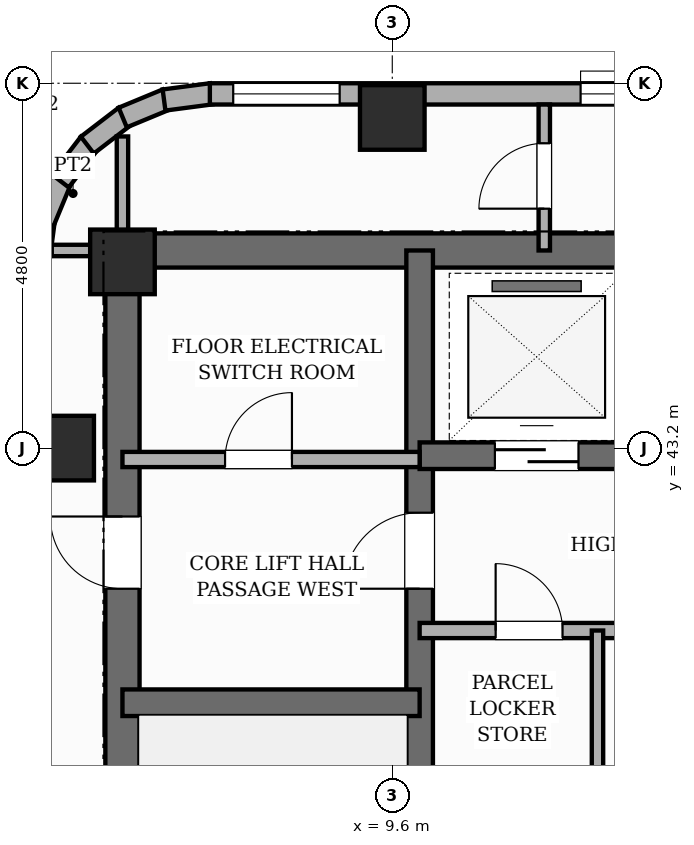
"""IFC4 building model, lengths in metres.
Left out: names, types, materials, properties, quantities, classifications, styles, units other than length and angle.
Written with IfcOpenShell. Run it as: python <this file> out.ifc"""

import sys

from ifc_helpers import new_model, si_unit, direction, frame, frame_2d, origin, origin_2d, place, context, subcontext, project, spatial, rectangle, extrude, element, fill, save


model = new_model("IFC4")
c1 = context("Model", 3, precision=1e-05, world=origin(), true_north=direction((0.0, 1.0)))
c2 = subcontext(c1, "Body", "Model", "MODEL_VIEW")
j1 = project(units=[si_unit("LENGTHUNIT", "METRE"), si_unit("PLANEANGLEUNIT", "RADIAN")], contexts=[c1])
p1 = place(None, origin())
s1 = spatial("IfcSite", under=j1, at=p1, CompositionType="ELEMENT")
p2 = place(p1, origin())
s2 = spatial("IfcBuilding", under=s1, at=p2, CompositionType="ELEMENT")
p3 = place(p2, frame((0.0, 0.0, 207.4)))
s3 = spatial("IfcBuildingStorey", under=s2, at=p3, CompositionType="ELEMENT", Elevation=207.4)
p4 = place(p3, frame((6.05, 30.675, 0.0), z_axis=(0.0, 0.0, 1.0), x_axis=(0.0, 1.0, 0.0)))
e1 = element("IfcWall", 1, at=p4, inside=s3, PredefinedType="SHEAR", context=c2, shape_type="SweptSolid", body=[
    extrude(rectangle(XDim=15.35, YDim=0.45, at=frame_2d((7.675, 0.0))), origin(), (0.0, 0.0, 1.0), 3.6),
])
p5 = place(p4, frame((10.675, 0.0, 0.0)))
e2 = element("IfcOpeningElement", 2, at=p5, cuts=e1, PredefinedType="OPENING", context=c2, shape_type="SweptSolid", body=[
    extrude(rectangle(XDim=0.95, YDim=2.15, at=frame_2d((0.475, 1.075))), frame((0.0, 0.235, 0.0), z_axis=(0.0, -1.0, 0.0), x_axis=(1.0, 0.0, 0.0)), (0.0, 0.0, 1.0), 0.47),
])
p6 = place(p3, frame((6.05, 45.8, 0.0), z_axis=(0.0, 0.0, 1.0), x_axis=(1.0, 0.0, 0.0)))
e3 = element("IfcWall", 3, at=p6, inside=s3, PredefinedType="SHEAR", context=c2, shape_type="SweptSolid", body=[
    extrude(rectangle(XDim=16.7, YDim=0.45, at=frame_2d((8.35, 0.0))), origin(), (0.0, 0.0, 1.0), 3.6),
])
p7 = place(p3, frame((9.96, 30.9, 0.0), z_axis=(0.0, 0.0, 1.0), x_axis=(0.0, 1.0, 0.0)))
e4 = element("IfcWall", 4, at=p7, inside=s3, PredefinedType="SHEAR", context=c2, shape_type="SweptSolid", body=[
    extrude(rectangle(XDim=14.9, YDim=0.35, at=frame_2d((7.45, 0.0))), origin(), (0.0, 0.0, 1.0), 3.6),
])
p8 = place(p7, frame((0.65, 0.0, 0.0)))
e5 = element("IfcOpeningElement", 5, at=p8, cuts=e4, PredefinedType="OPENING", context=c2, shape_type="SweptSolid", body=[
    extrude(rectangle(XDim=0.95, YDim=2.1, at=frame_2d((0.475, 1.05))), frame((0.0, 0.185, 0.0), z_axis=(0.0, -1.0, 0.0), x_axis=(1.0, 0.0, 0.0)), (0.0, 0.0, 1.0), 0.37),
])
p9 = place(p7, frame((10.45, 0.0, 0.0)))
e6 = element("IfcOpeningElement", 6, at=p9, cuts=e4, PredefinedType="OPENING", context=c2, shape_type="SweptSolid", body=[
    extrude(rectangle(XDim=1.0, YDim=2.15, at=frame_2d((0.5, 1.075))), frame((0.0, 0.185, 0.0), z_axis=(0.0, -1.0, 0.0), x_axis=(1.0, 0.0, 0.0)), (0.0, 0.0, 1.0), 0.37),
])
p10 = place(p3, frame((6.05, 39.85, 0.0), z_axis=(0.0, 0.0, 1.0), x_axis=(1.0, 0.0, 0.0)))
e7 = element("IfcWall", 7, at=p10, inside=s3, PredefinedType="SHEAR", context=c2, shape_type="SweptSolid", body=[
    extrude(rectangle(XDim=3.91, YDim=0.35, at=frame_2d((1.955, 0.0))), origin(), (0.0, 0.0, 1.0), 3.6),
])
p11 = place(p3, frame((9.96, 43.1, 0.0), z_axis=(0.0, 0.0, 1.0), x_axis=(1.0, 0.0, 0.0)))
e8 = element("IfcWall", 8, at=p11, inside=s3, PredefinedType="SHEAR", context=c2, shape_type="SweptSolid", body=[
    extrude(rectangle(XDim=8.88, YDim=0.35, at=frame_2d((4.44, 0.0))), origin(), (0.0, 0.0, 1.0), 3.6),
])
p12 = place(p11, frame((0.99, 0.0, 0.0)))
e9 = element("IfcOpeningElement", 9, at=p12, cuts=e8, PredefinedType="OPENING", context=c2, shape_type="SweptSolid", body=[
    extrude(rectangle(XDim=1.1, YDim=2.15, at=frame_2d((0.55, 1.075))), frame((0.0, 0.185, 0.0), z_axis=(0.0, -1.0, 0.0), x_axis=(1.0, 0.0, 0.0)), (0.0, 0.0, 1.0), 0.37),
])
p13 = place(p11, frame((3.89, 0.0, 0.0)))
e10 = element("IfcOpeningElement", 10, at=p13, cuts=e8, PredefinedType="OPENING", context=c2, shape_type="SweptSolid", body=[
    extrude(rectangle(XDim=1.1, YDim=2.15, at=frame_2d((0.55, 1.075))), frame((0.0, 0.185, 0.0), z_axis=(0.0, -1.0, 0.0), x_axis=(1.0, 0.0, 0.0)), (0.0, 0.0, 1.0), 0.37),
])
p14 = place(p11, frame((6.79, 0.0, 0.0)))
e11 = element("IfcOpeningElement", 11, at=p14, cuts=e8, PredefinedType="OPENING", context=c2, shape_type="SweptSolid", body=[
    extrude(rectangle(XDim=1.1, YDim=2.15, at=frame_2d((0.55, 1.075))), frame((0.0, 0.185, 0.0), z_axis=(0.0, -1.0, 0.0), x_axis=(1.0, 0.0, 0.0)), (0.0, 0.0, 1.0), 0.37),
])
for number, where, z_axis, x_axis in (
    (12, (5.25, 43.2, 0.0), (0.0, 0.0, 1.0), (1.0, 0.0, 0.0)),
    (13, (6.05, 45.65, 0.0), (0.0, 0.0, 1.0), (1.0, 0.0, 0.0)),
    (14, (9.6, 47.55, 0.0), (0.0, 0.0, 1.0), (1.0, 0.0, 0.0)),
):
    element("IfcColumn", number, at=place(p3, frame(where, z_axis=z_axis, x_axis=x_axis)), inside=s3, PredefinedType="COLUMN", context=c2, shape_type="SweptSolid", body=[
        extrude(rectangle(XDim=0.85, YDim=0.85, at=origin_2d()), origin(), (0.0, 0.0, 1.0), 3.6),
    ])
for number, where, z_axis, x_axis in (
    (15, (4.939, 45.582, 0.0), (0.0, 0.0, 1.0), (0.131, 0.991, 0.0)),
    (16, (5.011, 46.167, 0.0), (0.0, 0.0, 1.0), (0.383, 0.924, 0.0)),
    (17, (5.233, 46.715, 0.0), (0.0, 0.0, 1.0), (0.609, 0.793, 0.0)),
    (18, (5.588, 47.186, 0.0), (0.0, 0.0, 1.0), (0.793, 0.609, 0.0)),
):
    element("IfcWall", number, at=place(p3, frame(where, z_axis=z_axis, x_axis=x_axis)), inside=s3, PredefinedType="STANDARD", context=c2, shape_type="SweptSolid", body=[
        extrude(rectangle(XDim=0.626, YDim=0.28, at=frame_2d((0.313, 0.0))), origin(), (0.0, 0.0, 1.0), 3.38),
    ])
p15 = place(p3, frame((6.054, 47.549, 0.0), z_axis=(0.0, 0.0, 1.0), x_axis=(0.923974080304, 0.382455093999, 0.0)))
e19 = element("IfcWall", 19, at=p15, inside=s3, PredefinedType="STANDARD", context=c2, shape_type="SweptSolid", body=[
    extrude(rectangle(XDim=0.626, YDim=0.28, at=frame_2d((0.313, 0.0))), origin(), (0.0, 0.0, 1.0), 3.38),
])
p16 = place(p3, frame((6.597, 47.779, 0.0), z_axis=(0.0, 0.0, 1.0), x_axis=(0.9914410257, 0.130555323746, 0.0)))
e20 = element("IfcWall", 20, at=p16, inside=s3, PredefinedType="STANDARD", context=c2, shape_type="SweptSolid", body=[
    extrude(rectangle(XDim=0.626, YDim=0.28, at=frame_2d((0.313, 0.0))), origin(), (0.0, 0.0, 1.0), 3.38),
])
p17 = place(p3, frame((7.2, 47.86, 0.0), z_axis=(0.0, 0.0, 1.0), x_axis=(1.0, 0.0, 0.0)))
e21 = element("IfcWall", 21, at=p17, inside=s3, PredefinedType="STANDARD", context=c2, shape_type="SweptSolid", body=[
    extrude(rectangle(XDim=43.2, YDim=0.28, at=frame_2d((21.6, 0.0))), origin(), (0.0, 0.0, 1.0), 2.66),
])
p18 = place(p17, frame((19.028, 0.0, 0.65)))
e22 = element("IfcOpeningElement", 22, at=p18, cuts=e21, PredefinedType="OPENING", context=c2, shape_type="SweptSolid", body=[
    extrude(rectangle(XDim=1.4, YDim=1.1, at=frame_2d((0.7, 0.55))), frame((0.0, 0.15, 0.0), z_axis=(0.0, -1.0, 0.0), x_axis=(1.0, 0.0, 0.0)), (0.0, 0.0, 1.0), 0.3),
])
p19 = place(p17, frame((0.308, 0.0, 0.65)))
e23 = element("IfcOpeningElement", 23, at=p19, cuts=e21, PredefinedType="OPENING", context=c2, shape_type="SweptSolid", body=[
    extrude(rectangle(XDim=1.4, YDim=1.1, at=frame_2d((0.7, 0.55))), frame((0.0, 0.15, 0.0), z_axis=(0.0, -1.0, 0.0), x_axis=(1.0, 0.0, 0.0)), (0.0, 0.0, 1.0), 0.3),
])
p20 = place(p17, frame((4.877, 0.0, 0.65)))
e24 = element("IfcOpeningElement", 24, at=p20, cuts=e21, PredefinedType="OPENING", context=c2, shape_type="SweptSolid", body=[
    extrude(rectangle(XDim=1.4, YDim=1.1, at=frame_2d((0.7, 0.55))), frame((0.0, 0.15, 0.0), z_axis=(0.0, -1.0, 0.0), x_axis=(1.0, 0.0, 0.0)), (0.0, 0.0, 1.0), 0.3),
])
p21 = place(p3, frame((9.96, 40.8, 0.0), z_axis=(0.0, 0.0, 1.0), x_axis=(1.0, 0.0, 0.0)))
e25 = element("IfcWall", 25, at=p21, inside=s3, PredefinedType="POLYGONAL", context=c2, shape_type="SweptSolid", body=[
    extrude(rectangle(XDim=8.88, YDim=0.2, at=frame_2d((4.44, 0.0))), origin(), (0.0, 0.0, 1.0), 3.38),
])
p22 = place(p21, frame((7.5, 0.0, 0.0)))
e26 = element("IfcOpeningElement", 26, at=p22, cuts=e25, PredefinedType="OPENING", context=c2, shape_type="SweptSolid", body=[
    extrude(rectangle(XDim=0.88, YDim=2.1, at=frame_2d((0.44, 1.05))), frame((0.0, 0.11, 0.0), z_axis=(0.0, -1.0, 0.0), x_axis=(1.0, 0.0, 0.0)), (0.0, 0.0, 1.0), 0.22),
])
p23 = place(p21, frame((1.0, 0.0, 0.0)))
e27 = element("IfcOpeningElement", 27, at=p23, cuts=e25, PredefinedType="OPENING", context=c2, shape_type="SweptSolid", body=[
    extrude(rectangle(XDim=0.88, YDim=2.1, at=frame_2d((0.44, 1.05))), frame((0.0, 0.11, 0.0), z_axis=(0.0, -1.0, 0.0), x_axis=(1.0, 0.0, 0.0)), (0.0, 0.0, 1.0), 0.22),
])
p24 = place(p21, frame((3.4, 0.0, 0.0)))
e28 = element("IfcOpeningElement", 28, at=p24, cuts=e25, PredefinedType="OPENING", context=c2, shape_type="SweptSolid", body=[
    extrude(rectangle(XDim=0.88, YDim=2.1, at=frame_2d((0.44, 1.05))), frame((0.0, 0.11, 0.0), z_axis=(0.0, -1.0, 0.0), x_axis=(1.0, 0.0, 0.0)), (0.0, 0.0, 1.0), 0.22),
])
p25 = place(p21, frame((5.55, 0.0, 0.0)))
e29 = element("IfcOpeningElement", 29, at=p25, cuts=e25, PredefinedType="OPENING", context=c2, shape_type="SweptSolid", body=[
    extrude(rectangle(XDim=0.88, YDim=2.1, at=frame_2d((0.44, 1.05))), frame((0.0, 0.11, 0.0), z_axis=(0.0, -1.0, 0.0), x_axis=(1.0, 0.0, 0.0)), (0.0, 0.0, 1.0), 0.22),
])
p26 = place(p3, frame((6.05, 43.05, 0.0), z_axis=(0.0, 0.0, 1.0), x_axis=(1.0, 0.0, 0.0)))
e30 = element("IfcWall", 30, at=p26, inside=s3, PredefinedType="POLYGONAL", context=c2, shape_type="SweptSolid", body=[
    extrude(rectangle(XDim=3.91, YDim=0.2, at=frame_2d((1.955, 0.0))), origin(), (0.0, 0.0, 1.0), 2.66),
])
p27 = place(p26, frame((1.35, 0.0, 0.0)))
e31 = element("IfcOpeningElement", 31, at=p27, cuts=e30, PredefinedType="OPENING", context=c2, shape_type="SweptSolid", body=[
    extrude(rectangle(XDim=0.88, YDim=2.1, at=frame_2d((0.44, 1.05))), frame((0.0, 0.11, 0.0), z_axis=(0.0, -1.0, 0.0), x_axis=(1.0, 0.0, 0.0)), (0.0, 0.0, 1.0), 0.22),
])
p28 = place(p3, frame((12.3, 38.72, 0.0), z_axis=(0.0, 0.0, 1.0), x_axis=(0.0, 1.0, 0.0)))
e32 = element("IfcWall", 32, at=p28, inside=s3, PredefinedType="PARTITIONING", context=c2, shape_type="SweptSolid", body=[
    extrude(rectangle(XDim=2.08, YDim=0.15, at=frame_2d((1.04, 0.0))), origin(), (0.0, 0.0, 1.0), 3.38),
])
p29 = place(p3, frame((5.12, 45.8, 0.0), z_axis=(0.0, 0.0, 1.0), x_axis=(1.0, 0.0, 0.0)))
e33 = element("IfcWall", 33, at=p29, inside=s3, PredefinedType="PARTITIONING", context=c2, shape_type="SweptSolid", body=[
    extrude(rectangle(XDim=0.93, YDim=0.15, at=frame_2d((0.465, 0.0))), origin(), (0.0, 0.0, 1.0), 3.38),
])
p30 = place(p3, frame((6.05, 45.8, 0.0), z_axis=(0.0, 0.0, 1.0), x_axis=(0.0, 1.0, 0.0)))
e34 = element("IfcWall", 34, at=p30, inside=s3, PredefinedType="PARTITIONING", context=c2, shape_type="SweptSolid", body=[
    extrude(rectangle(XDim=1.5, YDim=0.15, at=frame_2d((0.75, 0.0))), origin(), (0.0, 0.0, 1.0), 3.38),
])
p31 = place(p3, frame((11.6, 45.8, 0.0), z_axis=(0.0, 0.0, 1.0), x_axis=(0.0, 1.0, 0.0)))
e35 = element("IfcWall", 35, at=p31, inside=s3, PredefinedType="PARTITIONING", context=c2, shape_type="SweptSolid", body=[
    extrude(rectangle(XDim=1.92, YDim=0.15, at=frame_2d((0.96, 0.0))), origin(), (0.0, 0.0, 1.0), 3.38),
])
p32 = place(p31, frame((0.55, 0.0, 0.0)))
e36 = element("IfcOpeningElement", 36, at=p32, cuts=e35, PredefinedType="OPENING", context=c2, shape_type="SweptSolid", body=[
    extrude(rectangle(XDim=0.86, YDim=2.1, at=frame_2d((0.43, 1.05))), frame((0.0, 0.085, 0.0), z_axis=(0.0, -1.0, 0.0), x_axis=(1.0, 0.0, 0.0)), (0.0, 0.0, 1.0), 0.17),
])
p33 = place(p19, origin())
e37 = element("IfcWindow", 37, at=p33, inside=s3, PartitioningType="SINGLE_PANEL", PredefinedType="WINDOW", context=c2, shape_type="SweptSolid", body=[
    extrude(rectangle(XDim=1.4, YDim=1.1, at=frame_2d((0.7, 0.55))), frame((0.0, 0.03, 0.0), z_axis=(0.0, -1.0, 0.0), x_axis=(1.0, 0.0, 0.0)), (0.0, 0.0, 1.0), 0.06),
])
fill(e23, e37)
p34 = place(p20, origin())
e38 = element("IfcWindow", 38, at=p34, inside=s3, PartitioningType="SINGLE_PANEL", PredefinedType="WINDOW", context=c2, shape_type="SweptSolid", body=[
    extrude(rectangle(XDim=1.4, YDim=1.1, at=frame_2d((0.7, 0.55))), frame((0.0, 0.03, 0.0), z_axis=(0.0, -1.0, 0.0), x_axis=(1.0, 0.0, 0.0)), (0.0, 0.0, 1.0), 0.06),
])
fill(e24, e38)
p35 = place(p12, origin())
e39 = element("IfcDoor", 39, at=p35, inside=s3, OperationType="SLIDING_TO_LEFT", PredefinedType="DOOR", context=c2, shape_type="SweptSolid", body=[
    extrude(rectangle(XDim=1.1, YDim=2.15, at=frame_2d((0.55, 1.075))), frame((0.0, 0.025, 0.0), z_axis=(0.0, -1.0, 0.0), x_axis=(1.0, 0.0, 0.0)), (0.0, 0.0, 1.0), 0.05),
])
fill(e9, e39)
p36 = place(p9, origin())
e40 = element("IfcDoor", 40, at=p36, inside=s3, OperationType="SINGLE_SWING_LEFT", PredefinedType="DOOR", context=c2, shape_type="SweptSolid", body=[
    extrude(rectangle(XDim=1.0, YDim=2.15, at=frame_2d((0.5, 1.075))), frame((0.0, 0.025, 0.0), z_axis=(0.0, -1.0, 0.0), x_axis=(1.0, 0.0, 0.0)), (0.0, 0.0, 1.0), 0.05),
])
fill(e6, e40)
p37 = place(p5, origin())
e41 = element("IfcDoor", 41, at=p37, inside=s3, OperationType="SINGLE_SWING_RIGHT", PredefinedType="DOOR", context=c2, shape_type="SweptSolid", body=[
    extrude(rectangle(XDim=0.95, YDim=2.15, at=frame_2d((0.475, 1.075))), frame((0.0, 0.025, 0.0), z_axis=(0.0, -1.0, 0.0), x_axis=(1.0, 0.0, 0.0)), (0.0, 0.0, 1.0), 0.05),
])
fill(e2, e41)
p38 = place(p27, origin())
e42 = element("IfcDoor", 42, at=p38, inside=s3, OperationType="SINGLE_SWING_RIGHT", PredefinedType="DOOR", context=c2, shape_type="SweptSolid", body=[
    extrude(rectangle(XDim=0.88, YDim=2.1, at=frame_2d((0.44, 1.05))), frame((0.0, 0.025, 0.0), z_axis=(0.0, -1.0, 0.0), x_axis=(1.0, 0.0, 0.0)), (0.0, 0.0, 1.0), 0.05),
])
fill(e31, e42)
p39 = place(p23, origin())
e43 = element("IfcDoor", 43, at=p39, inside=s3, OperationType="SINGLE_SWING_LEFT", PredefinedType="DOOR", context=c2, shape_type="SweptSolid", body=[
    extrude(rectangle(XDim=0.88, YDim=2.1, at=frame_2d((0.44, 1.05))), frame((0.0, 0.025, 0.0), z_axis=(0.0, -1.0, 0.0), x_axis=(1.0, 0.0, 0.0)), (0.0, 0.0, 1.0), 0.05),
])
fill(e27, e43)
p40 = place(p32, origin())
e44 = element("IfcDoor", 44, at=p40, inside=s3, OperationType="SINGLE_SWING_LEFT", PredefinedType="DOOR", context=c2, shape_type="SweptSolid", body=[
    extrude(rectangle(XDim=0.86, YDim=2.1, at=frame_2d((0.43, 1.05))), frame((0.0, 0.025, 0.0), z_axis=(0.0, -1.0, 0.0), x_axis=(1.0, 0.0, 0.0)), (0.0, 0.0, 1.0), 0.05),
])
fill(e36, e44)
save(model, sys.argv[1])
